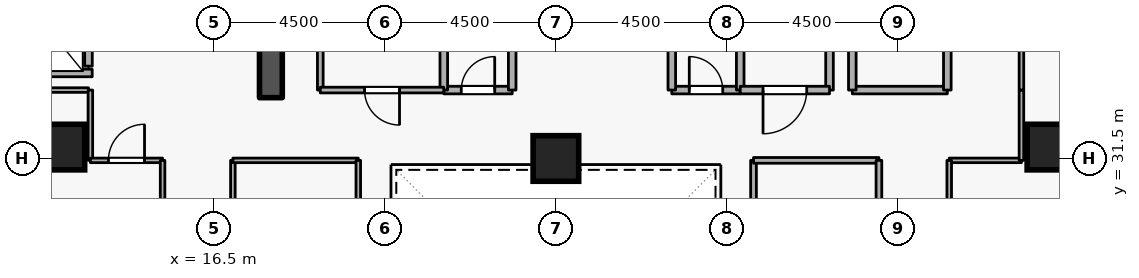
"""IFC4 building model, lengths in metres.
Left out: names, types, materials, properties, quantities, classifications, styles, units other than length and angle.
Written with IfcOpenShell. Run it as: python <this file> out.ifc"""

import sys

from ifc_helpers import new_model, si_unit, direction, frame, frame_2d, origin, origin_2d, place, context, subcontext, project, spatial, rectangle, extrude, element, fill, save


model = new_model("IFC4")
c1 = context("Model", 3, precision=1e-05, world=origin(), true_north=direction((0.0, 1.0)))
c2 = subcontext(c1, "Body", "Model", "MODEL_VIEW")
j1 = project(units=[si_unit("LENGTHUNIT", "METRE"), si_unit("PLANEANGLEUNIT", "RADIAN")], contexts=[c1])
p1 = place(None, origin())
s1 = spatial("IfcSite", under=j1, at=p1, CompositionType="ELEMENT")
p2 = place(p1, origin())
s2 = spatial("IfcBuilding", under=s1, at=p2, CompositionType="ELEMENT")
p3 = place(p2, frame((0.0, 0.0, 94.5)))
s3 = spatial("IfcBuildingStorey", under=s2, at=p3, CompositionType="ELEMENT", Elevation=94.5)
p4 = place(p3, frame((18.0, 33.1, 0.0), z_axis=(0.0, 0.0, 1.0), x_axis=(0.0, 1.0, 0.0)))
e1 = element("IfcWall", 1, at=p4, inside=s3, PredefinedType="SHEAR", context=c2, shape_type="SweptSolid", body=[
    extrude(rectangle(XDim=5.7, YDim=0.6, at=frame_2d((2.85, 0.0))), origin(), (0.0, 0.0, 1.0), 3.6),
])
for number, where, z_axis, x_axis in (
    (2, (12.5, 31.8, 0.0), (0.0, 0.0, 1.0), (1.0, 0.0, 0.0)),
    (3, (38.5, 31.8, 0.0), (0.0, 0.0, 1.0), (1.0, 0.0, 0.0)),
    (4, (25.5, 31.5, 0.0), (0.0, 0.0, 1.0), (1.0, 0.0, 0.0)),
):
    element("IfcColumn", number, at=place(p3, frame(where, z_axis=z_axis, x_axis=x_axis)), inside=s3, PredefinedType="COLUMN", context=c2, shape_type="SweptSolid", body=[
        extrude(rectangle(XDim=1.2, YDim=1.2, at=origin_2d()), origin(), (0.0, 0.0, 1.0), 3.6),
    ])
p5 = place(p3, frame((13.2, 33.93, 0.0), z_axis=(0.0, 0.0, 1.0), x_axis=(0.0, 1.0, 0.0)))
e5 = element("IfcWall", 5, at=p5, inside=s3, PredefinedType="STANDARD", context=c2, shape_type="SweptSolid", body=[
    extrude(rectangle(XDim=1.94, YDim=0.2, at=frame_2d((0.97, 0.0))), origin(), (0.0, 0.0, 1.0), 3.3),
])
p6 = place(p5, frame((0.46, 0.0, 0.0)))
e6 = element("IfcOpeningElement", 6, at=p6, cuts=e5, PredefinedType="OPENING", context=c2, shape_type="SweptSolid", body=[
    extrude(rectangle(XDim=1.02, YDim=2.06, at=frame_2d((0.51, 1.03))), frame((0.0, 0.11, 0.0), z_axis=(0.0, -1.0, 0.0), x_axis=(1.0, 0.0, 0.0)), (0.0, 0.0, 1.0), 0.22),
])
p7 = place(p3, frame((11.002, 33.75, 0.0), z_axis=(0.0, 0.0, 1.0), x_axis=(1.0, 0.0, 0.0)))
e7 = element("IfcWall", 7, at=p7, inside=s3, PredefinedType="STANDARD", context=c2, shape_type="SweptSolid", body=[
    extrude(rectangle(XDim=2.296, YDim=0.2, at=frame_2d((1.148, 0.0))), origin(), (0.0, 0.0, 1.0), 3.3),
])
p8 = place(p3, frame((33.3, 33.3, 0.0), z_axis=(0.0, 0.0, 1.0), x_axis=(1.0, 0.0, 0.0)))
e8 = element("IfcWall", 8, at=p8, inside=s3, PredefinedType="STANDARD", context=c2, shape_type="SweptSolid", body=[
    extrude(rectangle(XDim=2.5, YDim=0.2, at=frame_2d((1.25, 0.0))), origin(), (0.0, 0.0, 1.0), 3.3),
])
p9 = place(p3, frame((35.8, 33.3, 0.0), z_axis=(0.0, 0.0, 1.0), x_axis=(0.0, 1.0, 0.0)))
e9 = element("IfcWall", 9, at=p9, inside=s3, PredefinedType="STANDARD", context=c2, shape_type="SweptSolid", body=[
    extrude(rectangle(XDim=5.7, YDim=0.2, at=frame_2d((2.85, 0.0))), origin(), (0.0, 0.0, 1.0), 3.3),
])
p10 = place(p9, frame((2.275, 0.0, 0.0)))
e10 = element("IfcOpeningElement", 10, at=p10, cuts=e9, PredefinedType="OPENING", context=c2, shape_type="SweptSolid", body=[
    extrude(rectangle(XDim=1.15, YDim=2.1, at=frame_2d((0.575, 1.05))), frame((0.0, 0.11, 0.0), z_axis=(0.0, -1.0, 0.0), x_axis=(1.0, 0.0, 0.0)), (0.0, 0.0, 1.0), 0.22),
])
p11 = place(p3, frame((33.3, 35.6, 0.0), z_axis=(0.0, 0.0, 1.0), x_axis=(0.0, -1.0, 0.0)))
e11 = element("IfcWall", 11, at=p11, inside=s3, PredefinedType="STANDARD", context=c2, shape_type="SweptSolid", body=[
    extrude(rectangle(XDim=2.3, YDim=0.2, at=frame_2d((1.15, 0.0))), origin(), (0.0, 0.0, 1.0), 2.505),
])
p12 = place(p3, frame((22.55, 33.3, 0.0), z_axis=(0.0, 0.0, 1.0), x_axis=(1.0, 0.0, 0.0)))
e12 = element("IfcWall", 12, at=p12, inside=s3, PredefinedType="STANDARD", context=c2, shape_type="SweptSolid", body=[
    extrude(rectangle(XDim=1.8, YDim=0.2, at=frame_2d((0.9, 0.0))), origin(), (0.0, 0.0, 1.0), 3.3),
])
p13 = place(p12, frame((0.46, 0.0, 0.0)))
e13 = element("IfcOpeningElement", 13, at=p13, cuts=e12, PredefinedType="OPENING", context=c2, shape_type="SweptSolid", body=[
    extrude(rectangle(XDim=0.88, YDim=2.04, at=frame_2d((0.44, 1.02))), frame((0.0, 0.11, 0.0), z_axis=(0.0, -1.0, 0.0), x_axis=(1.0, 0.0, 0.0)), (0.0, 0.0, 1.0), 0.22),
])
for number, where, z_axis, x_axis in (
    (14, (24.35, 33.3, 0.0), (0.0, 0.0, 1.0), (0.0, 1.0, 0.0)),
    (15, (22.55, 35.35, 0.0), (0.0, 0.0, 1.0), (0.0, -1.0, 0.0)),
):
    element("IfcWall", number, at=place(p3, frame(where, z_axis=z_axis, x_axis=x_axis)), inside=s3, PredefinedType="STANDARD", context=c2, shape_type="SweptSolid", body=[
        extrude(rectangle(XDim=2.05, YDim=0.2, at=frame_2d((1.025, 0.0))), origin(), (0.0, 0.0, 1.0), 3.3),
    ])
p14 = place(p3, frame((28.55, 33.3, 0.0), z_axis=(0.0, 0.0, 1.0), x_axis=(1.0, 0.0, 0.0)))
e16 = element("IfcWall", 16, at=p14, inside=s3, PredefinedType="STANDARD", context=c2, shape_type="SweptSolid", body=[
    extrude(rectangle(XDim=1.8, YDim=0.2, at=frame_2d((0.9, 0.0))), origin(), (0.0, 0.0, 1.0), 3.3),
])
p15 = place(p14, frame((0.46, 0.0, 0.0)))
e17 = element("IfcOpeningElement", 17, at=p15, cuts=e16, PredefinedType="OPENING", context=c2, shape_type="SweptSolid", body=[
    extrude(rectangle(XDim=0.88, YDim=2.04, at=frame_2d((0.44, 1.02))), frame((0.0, 0.11, 0.0), z_axis=(0.0, -1.0, 0.0), x_axis=(1.0, 0.0, 0.0)), (0.0, 0.0, 1.0), 0.22),
])
for number, where, z_axis, x_axis in (
    (18, (30.35, 33.3, 0.0), (0.0, 0.0, 1.0), (0.0, 1.0, 0.0)),
    (19, (28.55, 35.35, 0.0), (0.0, 0.0, 1.0), (0.0, -1.0, 0.0)),
):
    element("IfcWall", number, at=place(p3, frame(where, z_axis=z_axis, x_axis=x_axis)), inside=s3, PredefinedType="STANDARD", context=c2, shape_type="SweptSolid", body=[
        extrude(rectangle(XDim=2.05, YDim=0.2, at=frame_2d((1.025, 0.0))), origin(), (0.0, 0.0, 1.0), 3.3),
    ])
p16 = place(p3, frame((32.7, 35.35, 0.0), z_axis=(0.0, 0.0, 1.0), x_axis=(0.0, -1.0, 0.0)))
e20 = element("IfcWall", 20, at=p16, inside=s3, PredefinedType="STANDARD", context=c2, shape_type="SweptSolid", body=[
    extrude(rectangle(XDim=2.05, YDim=0.2, at=frame_2d((1.025, 0.0))), origin(), (0.0, 0.0, 1.0), 2.505),
])
p17 = place(p3, frame((32.7, 33.3, 0.0), z_axis=(0.0, 0.0, 1.0), x_axis=(-1.0, 0.0, 0.0)))
e21 = element("IfcWall", 21, at=p17, inside=s3, PredefinedType="STANDARD", context=c2, shape_type="SweptSolid", body=[
    extrude(rectangle(XDim=2.35, YDim=0.2, at=frame_2d((1.175, 0.0))), origin(), (0.0, 0.0, 1.0), 3.3),
])
p18 = place(p17, frame((0.6, 0.0, 0.0)))
e22 = element("IfcOpeningElement", 22, at=p18, cuts=e21, PredefinedType="OPENING", context=c2, shape_type="SweptSolid", body=[
    extrude(rectangle(XDim=1.15, YDim=2.1, at=frame_2d((0.575, 1.05))), frame((0.0, 0.11, 0.0), z_axis=(0.0, -1.0, 0.0), x_axis=(1.0, 0.0, 0.0)), (0.0, 0.0, 1.0), 0.22),
])
p19 = place(p3, frame((19.3, 33.3, 0.0), z_axis=(0.0, 0.0, 1.0), x_axis=(0.0, 1.0, 0.0)))
e23 = element("IfcWall", 23, at=p19, inside=s3, PredefinedType="PARTITIONING", context=c2, shape_type="SweptSolid", body=[
    extrude(rectangle(XDim=2.05, YDim=0.15, at=frame_2d((1.025, 0.0))), origin(), (0.0, 0.0, 1.0), 3.3),
])
p20 = place(p3, frame((22.55, 33.3, 0.0), z_axis=(0.0, 0.0, 1.0), x_axis=(-1.0, 0.0, 0.0)))
e24 = element("IfcWall", 24, at=p20, inside=s3, PredefinedType="PARTITIONING", context=c2, shape_type="SweptSolid", body=[
    extrude(rectangle(XDim=3.25, YDim=0.15, at=frame_2d((1.625, 0.0))), origin(), (0.0, 0.0, 1.0), 3.3),
])
p21 = place(p20, frame((1.165, 0.0, 0.0)))
e25 = element("IfcOpeningElement", 25, at=p21, cuts=e24, PredefinedType="OPENING", context=c2, shape_type="SweptSolid", body=[
    extrude(rectangle(XDim=0.92, YDim=2.08, at=frame_2d((0.46, 1.04))), frame((0.0, 0.085, 0.0), z_axis=(0.0, -1.0, 0.0), x_axis=(1.0, 0.0, 0.0)), (0.0, 0.0, 1.0), 0.17),
])
p22 = place(p3, frame((10.9, 33.3, 0.0), z_axis=(0.0, 0.0, 1.0), x_axis=(1.0, 0.0, 0.0)))
e26 = element("IfcWall", 26, at=p22, inside=s3, PredefinedType="PARTITIONING", context=c2, shape_type="SweptSolid", body=[
    extrude(rectangle(XDim=2.3, YDim=0.12, at=frame_2d((1.15, 0.0))), origin(), (0.0, 0.0, 1.0), 3.3),
])
p23 = place(p3, frame((13.25, 33.3, 0.0), z_axis=(0.0, 0.0, 1.0), x_axis=(0.0, -1.0, 0.0)))
e27 = element("IfcWall", 27, at=p23, inside=s3, PredefinedType="PARTITIONING", context=c2, shape_type="SweptSolid", body=[
    extrude(rectangle(XDim=1.85, YDim=0.12, at=frame_2d((0.925, 0.0))), origin(), (0.0, 0.0, 1.0), 3.3),
])
p24 = place(p3, frame((13.25, 31.45, 0.0), z_axis=(0.0, 0.0, 1.0), x_axis=(1.0, 0.0, 0.0)))
e28 = element("IfcWall", 28, at=p24, inside=s3, PredefinedType="PARTITIONING", context=c2, shape_type="SweptSolid", body=[
    extrude(rectangle(XDim=1.9, YDim=0.12, at=frame_2d((0.95, 0.0))), origin(), (0.0, 0.0, 1.0), 3.3),
])
p25 = place(p24, frame((0.475, 0.0, 0.0)))
e29 = element("IfcOpeningElement", 29, at=p25, cuts=e28, PredefinedType="OPENING", context=c2, shape_type="SweptSolid", body=[
    extrude(rectangle(XDim=0.95, YDim=2.1, at=frame_2d((0.475, 1.05))), frame((0.0, 0.07, 0.0), z_axis=(0.0, -1.0, 0.0), x_axis=(1.0, 0.0, 0.0)), (0.0, 0.0, 1.0), 0.14),
])
p26 = place(p3, frame((15.15, 31.45, 0.0), z_axis=(0.0, 0.0, 1.0), x_axis=(0.0, -1.0, 0.0)))
e30 = element("IfcWall", 30, at=p26, inside=s3, PredefinedType="PARTITIONING", context=c2, shape_type="SweptSolid", body=[
    extrude(rectangle(XDim=1.3, YDim=0.12, at=frame_2d((0.65, 0.0))), origin(), (0.0, 0.0, 1.0), 3.3),
])
p27 = place(p3, frame((35.85, 31.45, 0.0), z_axis=(0.0, 0.0, 1.0), x_axis=(1.0, 0.0, 0.0)))
e31 = element("IfcWall", 31, at=p27, inside=s3, PredefinedType="PARTITIONING", context=c2, shape_type="SweptSolid", body=[
    extrude(rectangle(XDim=1.9, YDim=0.12, at=frame_2d((0.95, 0.0))), origin(), (0.0, 0.0, 1.0), 3.3),
])
p28 = place(p3, frame((37.75, 31.45, 0.0), z_axis=(0.0, 0.0, 1.0), x_axis=(0.0, 1.0, 0.0)))
e32 = element("IfcWall", 32, at=p28, inside=s3, PredefinedType="PARTITIONING", context=c2, shape_type="SweptSolid", body=[
    extrude(rectangle(XDim=1.85, YDim=0.12, at=frame_2d((0.925, 0.0))), origin(), (0.0, 0.0, 1.0), 3.3),
])
p29 = place(p3, frame((37.75, 33.3, 0.0), z_axis=(0.0, 0.0, 1.0), x_axis=(0.0, 1.0, 0.0)))
e33 = element("IfcWall", 33, at=p29, inside=s3, PredefinedType="PARTITIONING", context=c2, shape_type="SweptSolid", body=[
    extrude(rectangle(XDim=9.35, YDim=0.12, at=frame_2d((4.675, 0.0))), origin(), (0.0, 0.0, 1.0), 3.3),
])
p30 = place(p29, frame((4.15, 0.0, 0.0)))
e34 = element("IfcOpeningElement", 34, at=p30, cuts=e33, PredefinedType="OPENING", context=c2, shape_type="SweptSolid", body=[
    extrude(rectangle(XDim=1.05, YDim=2.1, at=frame_2d((0.525, 1.05))), frame((0.0, 0.07, 0.0), z_axis=(0.0, -1.0, 0.0), x_axis=(1.0, 0.0, 0.0)), (0.0, 0.0, 1.0), 0.14),
])
p31 = place(p3, frame((35.85, 30.15, 0.0), z_axis=(0.0, 0.0, 1.0), x_axis=(0.0, 1.0, 0.0)))
e35 = element("IfcWall", 35, at=p31, inside=s3, PredefinedType="PARTITIONING", context=c2, shape_type="SweptSolid", body=[
    extrude(rectangle(XDim=1.3, YDim=0.12, at=frame_2d((0.65, 0.0))), origin(), (0.0, 0.0, 1.0), 3.3),
])
p32 = place(p3, frame((30.7, 22.55, 0.0), z_axis=(0.0, 0.0, 1.0), x_axis=(0.0, 1.0, 0.0)))
e36 = element("IfcWall", 36, at=p32, inside=s3, PredefinedType="PARTITIONING", context=c2, shape_type="SweptSolid", body=[
    extrude(rectangle(XDim=8.9, YDim=0.15, at=frame_2d((4.45, 0.0))), origin(), (0.0, 0.0, 1.0), 3.3),
])
p33 = place(p3, frame((30.7, 31.45, 0.0), z_axis=(0.0, 0.0, 1.0), x_axis=(1.0, 0.0, 0.0)))
e37 = element("IfcWall", 37, at=p33, inside=s3, PredefinedType="PARTITIONING", context=c2, shape_type="SweptSolid", body=[
    extrude(rectangle(XDim=3.3, YDim=0.15, at=frame_2d((1.65, 0.0))), origin(), (0.0, 0.0, 1.0), 3.3),
])
p34 = place(p3, frame((34.0, 31.45, 0.0), z_axis=(0.0, 0.0, 1.0), x_axis=(0.0, -1.0, 0.0)))
e38 = element("IfcWall", 38, at=p34, inside=s3, PredefinedType="PARTITIONING", context=c2, shape_type="SweptSolid", body=[
    extrude(rectangle(XDim=8.9, YDim=0.15, at=frame_2d((4.45, 0.0))), origin(), (0.0, 0.0, 1.0), 3.3),
])
p35 = place(p34, frame((3.8, 0.0, 0.0)))
e39 = element("IfcOpeningElement", 39, at=p35, cuts=e38, PredefinedType="OPENING", context=c2, shape_type="SweptSolid", body=[
    extrude(rectangle(XDim=1.3, YDim=2.12, at=frame_2d((0.65, 1.06))), frame((0.0, 0.085, 0.0), z_axis=(0.0, -1.0, 0.0), x_axis=(1.0, 0.0, 0.0)), (0.0, 0.0, 1.0), 0.17),
])
p36 = place(p3, frame((17.0, 22.55, 0.0), z_axis=(0.0, 0.0, 1.0), x_axis=(0.0, 1.0, 0.0)))
e40 = element("IfcWall", 40, at=p36, inside=s3, PredefinedType="PARTITIONING", context=c2, shape_type="SweptSolid", body=[
    extrude(rectangle(XDim=8.9, YDim=0.12, at=frame_2d((4.45, 0.0))), origin(), (0.0, 0.0, 1.0), 3.3),
])
p37 = place(p36, frame((2.875, 0.0, 0.0)))
e41 = element("IfcOpeningElement", 41, at=p37, cuts=e40, PredefinedType="OPENING", context=c2, shape_type="SweptSolid", body=[
    extrude(rectangle(XDim=0.95, YDim=2.1, at=frame_2d((0.475, 1.05))), frame((0.0, 0.07, 0.0), z_axis=(0.0, -1.0, 0.0), x_axis=(1.0, 0.0, 0.0)), (0.0, 0.0, 1.0), 0.14),
])
p38 = place(p3, frame((17.0, 31.45, 0.0), z_axis=(0.0, 0.0, 1.0), x_axis=(1.0, 0.0, 0.0)))
e42 = element("IfcWall", 42, at=p38, inside=s3, PredefinedType="PARTITIONING", context=c2, shape_type="SweptSolid", body=[
    extrude(rectangle(XDim=3.3, YDim=0.12, at=frame_2d((1.65, 0.0))), origin(), (0.0, 0.0, 1.0), 3.3),
])
p39 = place(p3, frame((20.3, 31.45, 0.0), z_axis=(0.0, 0.0, 1.0), x_axis=(0.0, -1.0, 0.0)))
e43 = element("IfcWall", 43, at=p39, inside=s3, PredefinedType="PARTITIONING", context=c2, shape_type="SweptSolid", body=[
    extrude(rectangle(XDim=8.9, YDim=0.12, at=frame_2d((4.45, 0.0))), origin(), (0.0, 0.0, 1.0), 3.3),
])
p40 = place(p13, origin())
e44 = element("IfcDoor", 44, at=p40, inside=s3, OperationType="SINGLE_SWING_RIGHT", PredefinedType="DOOR", context=c2, shape_type="SweptSolid", body=[
    extrude(rectangle(XDim=0.88, YDim=2.04, at=frame_2d((0.44, 1.02))), frame((0.0, 0.025, 0.0), z_axis=(0.0, -1.0, 0.0), x_axis=(1.0, 0.0, 0.0)), (0.0, 0.0, 1.0), 0.05),
])
fill(e13, e44)
p41 = place(p15, origin())
e45 = element("IfcDoor", 45, at=p41, inside=s3, OperationType="SINGLE_SWING_LEFT", PredefinedType="DOOR", context=c2, shape_type="SweptSolid", body=[
    extrude(rectangle(XDim=0.88, YDim=2.04, at=frame_2d((0.44, 1.02))), frame((0.0, 0.025, 0.0), z_axis=(0.0, -1.0, 0.0), x_axis=(1.0, 0.0, 0.0)), (0.0, 0.0, 1.0), 0.05),
])
fill(e17, e45)
p42 = place(p21, origin())
e46 = element("IfcDoor", 46, at=p42, inside=s3, OperationType="SINGLE_SWING_LEFT", PredefinedType="DOOR", context=c2, shape_type="SweptSolid", body=[
    extrude(rectangle(XDim=0.92, YDim=2.08, at=frame_2d((0.46, 1.04))), frame((0.0, 0.025, 0.0), z_axis=(0.0, -1.0, 0.0), x_axis=(1.0, 0.0, 0.0)), (0.0, 0.0, 1.0), 0.05),
])
fill(e25, e46)
p43 = place(p18, origin())
e47 = element("IfcDoor", 47, at=p43, inside=s3, OperationType="SINGLE_SWING_RIGHT", PredefinedType="DOOR", context=c2, shape_type="SweptSolid", body=[
    extrude(rectangle(XDim=1.15, YDim=2.1, at=frame_2d((0.575, 1.05))), frame((0.0, 0.025, 0.0), z_axis=(0.0, -1.0, 0.0), x_axis=(1.0, 0.0, 0.0)), (0.0, 0.0, 1.0), 0.05),
])
fill(e22, e47)
p44 = place(p25, origin())
e48 = element("IfcDoor", 48, at=p44, inside=s3, OperationType="SINGLE_SWING_RIGHT", PredefinedType="DOOR", context=c2, shape_type="SweptSolid", body=[
    extrude(rectangle(XDim=0.95, YDim=2.1, at=frame_2d((0.475, 1.05))), frame((0.0, 0.025, 0.0), z_axis=(0.0, -1.0, 0.0), x_axis=(1.0, 0.0, 0.0)), (0.0, 0.0, 1.0), 0.05),
])
fill(e29, e48)
save(model, sys.argv[1])
